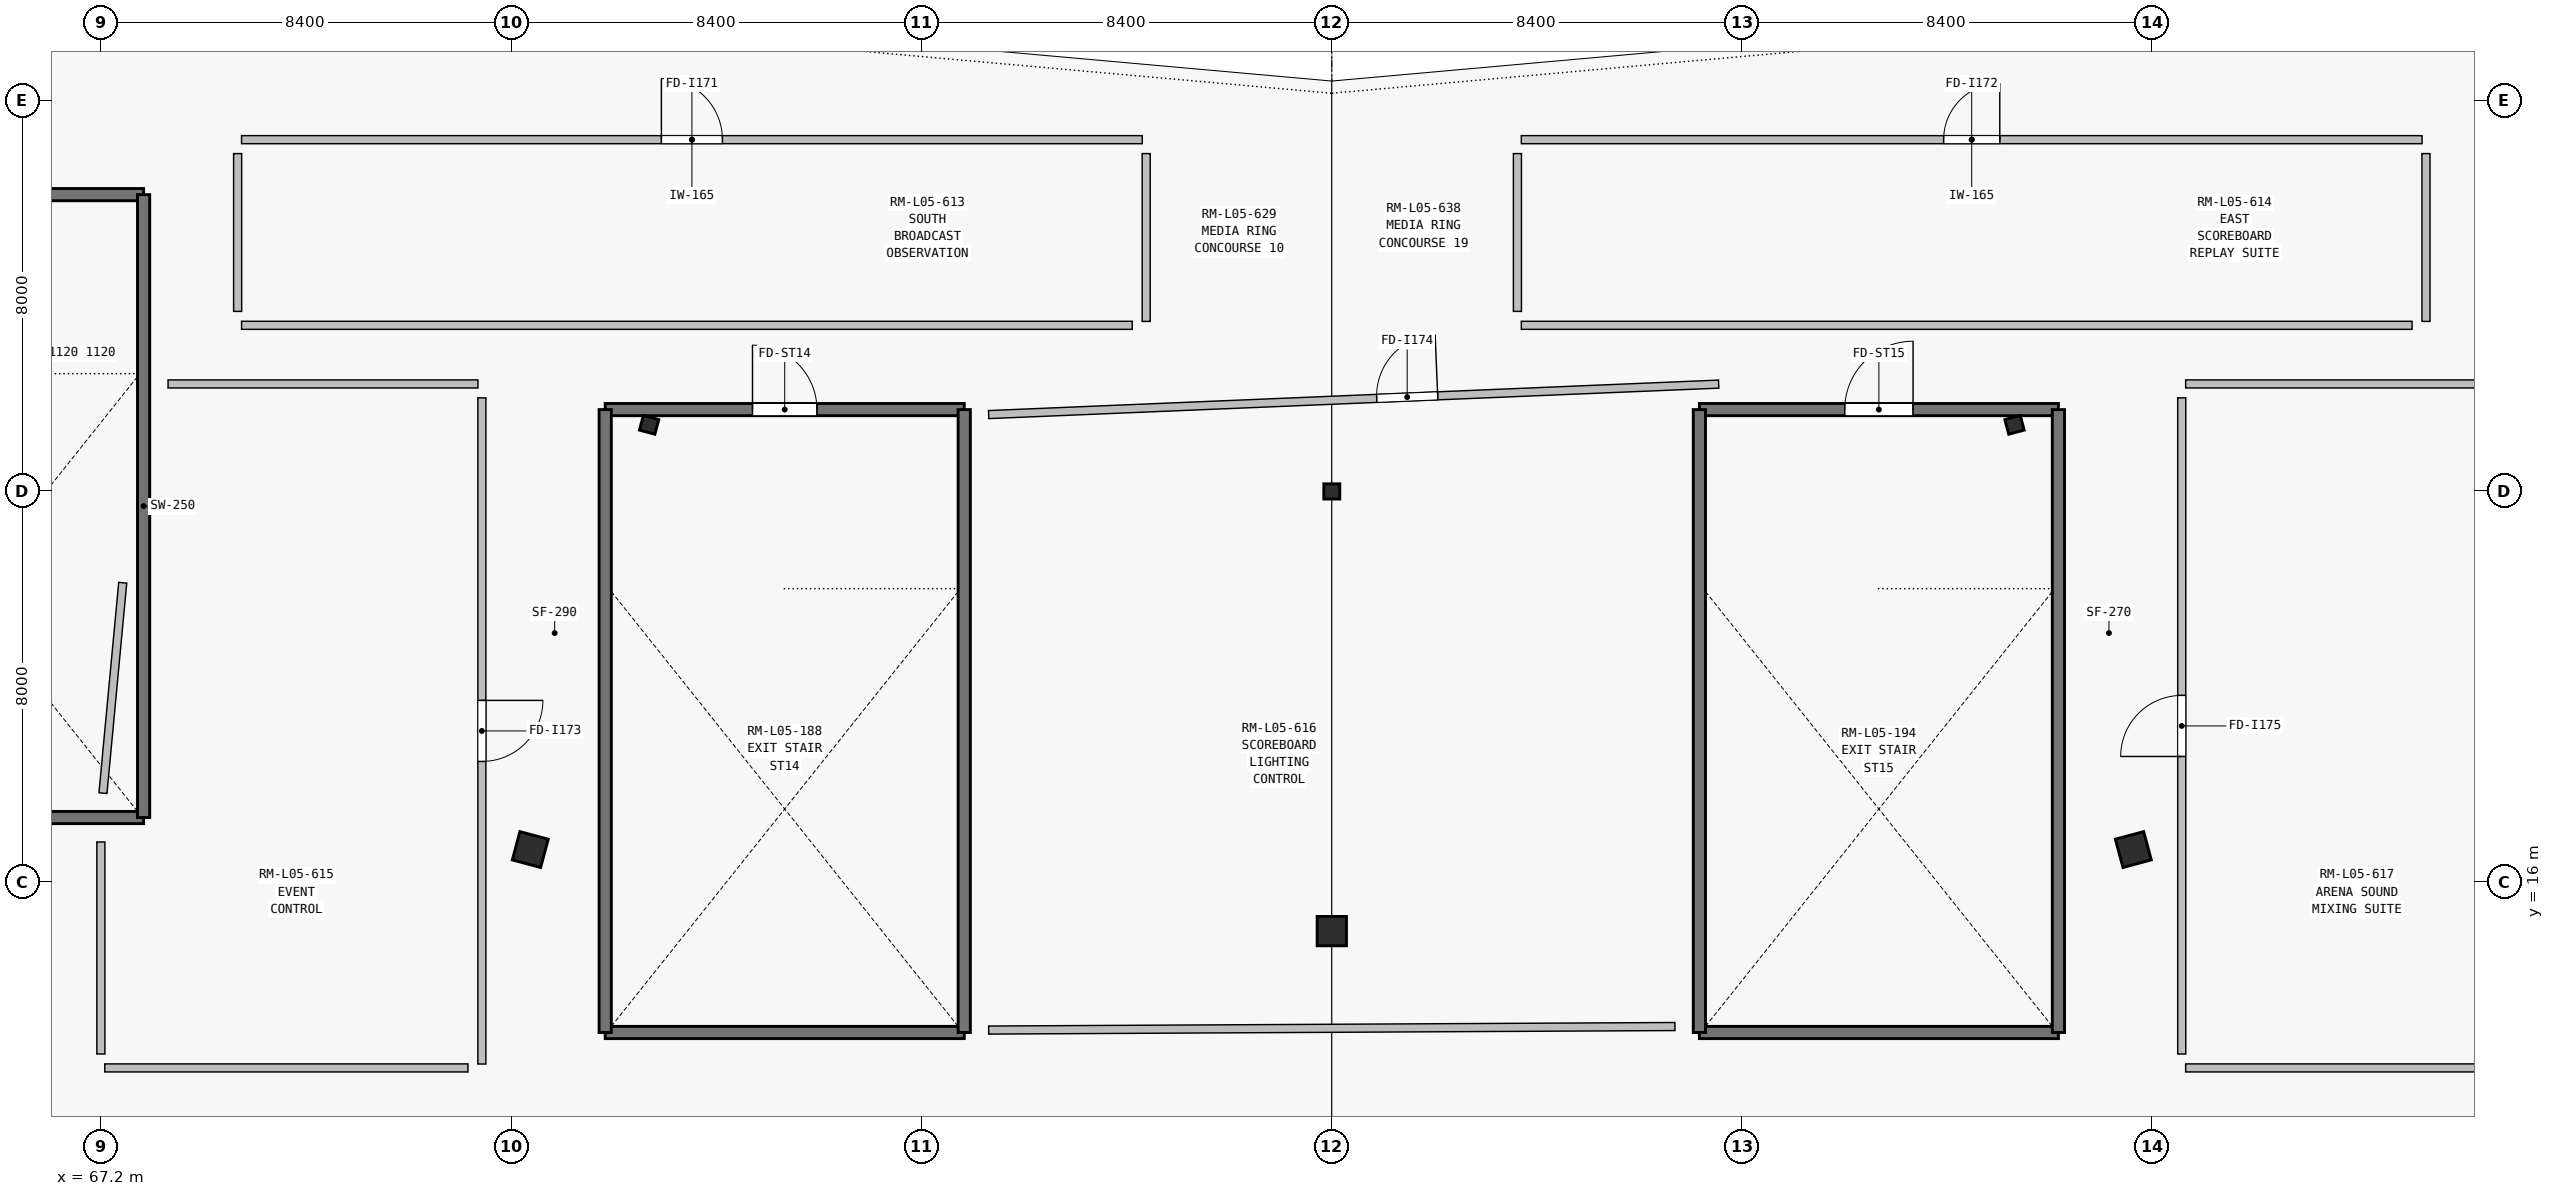
"""IFC4 building model, lengths in metres.
Left out: names, types, materials, properties, quantities, classifications, styles, units other than length and angle.
Written with IfcOpenShell. Run it as: python <this file> out.ifc"""

import sys

from ifc_helpers import new_model, si_unit, direction, frame, frame_2d, origin, origin_2d, place, context, subcontext, project, spatial, rectangle, i_section, extrude, element, fill, save


model = new_model("IFC4")
c1 = context("Model", 3, precision=1e-05, world=origin(), true_north=direction((0.0, 1.0)))
c2 = subcontext(c1, "Body", "Model", "MODEL_VIEW")
j1 = project(units=[si_unit("LENGTHUNIT", "METRE"), si_unit("PLANEANGLEUNIT", "RADIAN")], contexts=[c1])
p1 = place(None, origin())
s1 = spatial("IfcSite", under=j1, at=p1, CompositionType="ELEMENT")
p2 = place(p1, origin())
s2 = spatial("IfcBuilding", under=s1, at=p2, CompositionType="ELEMENT")
p3 = place(p2, frame((0.0, 0.0, 23.4)))
s3 = spatial("IfcBuildingStorey", under=s2, at=p3, CompositionType="ELEMENT", Elevation=23.4)
for number, where, z_axis, x_axis in (
    (1, (78.424, 25.363, 0.0), (0.0, 0.0, 1.0), (-0.259, -0.966, 0.0)),
    (2, (92.4, 24.0, 0.0), (0.0, 0.0, 1.0), (0.0, -1.0, 0.0)),
    (3, (106.376, 25.363, 0.0), (0.0, 0.0, 1.0), (0.259, -0.966, 0.0)),
):
    element("IfcColumn", number, at=place(p3, frame(where, z_axis=z_axis, x_axis=x_axis)), inside=s3, PredefinedType="COLUMN", context=c2, shape_type="SweptSolid", body=[
        extrude(i_section(OverallWidth=0.311, OverallDepth=0.327, WebThickness=0.016, FlangeThickness=0.025, at=origin_2d()), origin(), (0.0, 0.0, 1.0), 3.15),
    ])
for number, where, z_axis, x_axis in (
    (4, (75.991, 16.67, 0.0), (0.0, 0.0, 1.0), (-0.259, -0.966, 0.0)),
    (5, (92.4, 15.0, 0.0), (0.0, 0.0, 1.0), (0.0, -1.0, 0.0)),
    (6, (108.809, 16.67, 0.0), (0.0, 0.0, 1.0), (0.259, -0.966, 0.0)),
):
    element("IfcColumn", number, at=place(p3, frame(where, z_axis=z_axis, x_axis=x_axis)), inside=s3, PredefinedType="COLUMN", context=c2, shape_type="SweptSolid", body=[
        extrude(rectangle(XDim=0.6, YDim=0.6, at=origin_2d()), origin(), (0.0, 0.0, 1.0), 3.15),
    ])
p4 = place(p3, frame((73.849, 8.44, 0.0), z_axis=(0.0, 0.0, 1.0), x_axis=(-0.949760483421, 0.312977673536, 0.0)))
e7 = element("IfcWall", 7, at=p4, inside=s3, PredefinedType="SOLIDWALL", context=c2, shape_type="SweptSolid", body=[
    extrude(rectangle(XDim=18.693, YDim=0.265, at=frame_2d((9.346, 0.0))), origin(), (0.0, 0.0, 1.0), 3.18),
])
p5 = place(p4, frame((11.85, 0.0, 0.75)))
e8 = element("IfcOpeningElement", 8, at=p5, cuts=e7, PredefinedType="OPENING", context=c2, shape_type="SweptSolid", body=[
    extrude(rectangle(XDim=1.2, YDim=2.2, at=frame_2d((0.6, 1.1))), frame((0.0, 0.142, 0.0), z_axis=(0.0, -1.0, 0.0), x_axis=(1.0, 0.0, 0.0)), (0.0, 0.0, 1.0), 0.285),
])
p6 = place(p3, frame((60.725, 17.325, 0.0), z_axis=(0.0, 0.0, 1.0), x_axis=(1.0, 0.0, 0.0)))
e9 = element("IfcWall", 9, at=p6, inside=s3, PredefinedType="SHEAR", context=c2, shape_type="SweptSolid", body=[
    extrude(rectangle(XDim=7.35, YDim=0.25, at=frame_2d((3.675, 0.0))), origin(), (0.0, 0.0, 1.0), 3.08),
])
p7 = place(p3, frame((60.725, 30.075, 0.0), z_axis=(0.0, 0.0, 1.0), x_axis=(1.0, 0.0, 0.0)))
e10 = element("IfcWall", 10, at=p7, inside=s3, PredefinedType="SHEAR", context=c2, shape_type="SweptSolid", body=[
    extrude(rectangle(XDim=7.35, YDim=0.25, at=frame_2d((3.675, 0.0))), origin(), (0.0, 0.0, 1.0), 3.08),
])
p8 = place(p7, frame((2.975, 0.0, 0.0)))
e11 = element("IfcOpeningElement", 11, at=p8, cuts=e10, PredefinedType="OPENING", context=c2, shape_type="SweptSolid", body=[
    extrude(rectangle(XDim=1.4, YDim=2.2, at=frame_2d((0.7, 1.1))), frame((0.0, 0.135, 0.0), z_axis=(0.0, -1.0, 0.0), x_axis=(1.0, 0.0, 0.0)), (0.0, 0.0, 1.0), 0.27),
])
p9 = place(p3, frame((68.075, 17.325, 0.0), z_axis=(0.0, 0.0, 1.0), x_axis=(0.0, 1.0, 0.0)))
e12 = element("IfcWall", 12, at=p9, inside=s3, PredefinedType="SHEAR", context=c2, shape_type="SweptSolid", body=[
    extrude(rectangle(XDim=12.75, YDim=0.25, at=frame_2d((6.375, 0.0))), origin(), (0.0, 0.0, 1.0), 3.08),
])
p10 = place(p3, frame((77.525, 12.925, 0.0), z_axis=(0.0, 0.0, 1.0), x_axis=(1.0, 0.0, 0.0)))
e13 = element("IfcWall", 13, at=p10, inside=s3, PredefinedType="SHEAR", context=c2, shape_type="SweptSolid", body=[
    extrude(rectangle(XDim=7.35, YDim=0.25, at=frame_2d((3.675, 0.0))), origin(), (0.0, 0.0, 1.0), 3.08),
])
p11 = place(p3, frame((77.525, 25.675, 0.0), z_axis=(0.0, 0.0, 1.0), x_axis=(1.0, 0.0, 0.0)))
e14 = element("IfcWall", 14, at=p11, inside=s3, PredefinedType="SHEAR", context=c2, shape_type="SweptSolid", body=[
    extrude(rectangle(XDim=7.35, YDim=0.25, at=frame_2d((3.675, 0.0))), origin(), (0.0, 0.0, 1.0), 3.08),
])
p12 = place(p11, frame((3.015, 0.0, 0.0)))
e15 = element("IfcOpeningElement", 15, at=p12, cuts=e14, PredefinedType="OPENING", context=c2, shape_type="SweptSolid", body=[
    extrude(rectangle(XDim=1.32, YDim=2.2, at=frame_2d((0.66, 1.1))), frame((0.0, 0.135, 0.0), z_axis=(0.0, -1.0, 0.0), x_axis=(1.0, 0.0, 0.0)), (0.0, 0.0, 1.0), 0.27),
])
for number, where, z_axis, x_axis in (
    (16, (77.525, 12.925, 0.0), (0.0, 0.0, 1.0), (0.0, 1.0, 0.0)),
    (17, (84.875, 12.925, 0.0), (0.0, 0.0, 1.0), (0.0, 1.0, 0.0)),
):
    element("IfcWall", number, at=place(p3, frame(where, z_axis=z_axis, x_axis=x_axis)), inside=s3, PredefinedType="SHEAR", context=c2, shape_type="SweptSolid", body=[
        extrude(rectangle(XDim=12.75, YDim=0.25, at=frame_2d((6.375, 0.0))), origin(), (0.0, 0.0, 1.0), 3.08),
    ])
p13 = place(p3, frame((99.925, 12.925, 0.0), z_axis=(0.0, 0.0, 1.0), x_axis=(1.0, 0.0, 0.0)))
e18 = element("IfcWall", 18, at=p13, inside=s3, PredefinedType="SHEAR", context=c2, shape_type="SweptSolid", body=[
    extrude(rectangle(XDim=7.35, YDim=0.25, at=frame_2d((3.675, 0.0))), origin(), (0.0, 0.0, 1.0), 3.08),
])
p14 = place(p3, frame((99.925, 25.675, 0.0), z_axis=(0.0, 0.0, 1.0), x_axis=(1.0, 0.0, 0.0)))
e19 = element("IfcWall", 19, at=p14, inside=s3, PredefinedType="SHEAR", context=c2, shape_type="SweptSolid", body=[
    extrude(rectangle(XDim=7.35, YDim=0.25, at=frame_2d((3.675, 0.0))), origin(), (0.0, 0.0, 1.0), 3.08),
])
p15 = place(p14, frame((2.975, 0.0, 0.0)))
e20 = element("IfcOpeningElement", 20, at=p15, cuts=e19, PredefinedType="OPENING", context=c2, shape_type="SweptSolid", body=[
    extrude(rectangle(XDim=1.4, YDim=2.2, at=frame_2d((0.7, 1.1))), frame((0.0, 0.135, 0.0), z_axis=(0.0, -1.0, 0.0), x_axis=(1.0, 0.0, 0.0)), (0.0, 0.0, 1.0), 0.27),
])
for number, where, z_axis, x_axis in (
    (21, (99.925, 12.925, 0.0), (0.0, 0.0, 1.0), (0.0, 1.0, 0.0)),
    (22, (107.275, 12.925, 0.0), (0.0, 0.0, 1.0), (0.0, 1.0, 0.0)),
):
    element("IfcWall", number, at=place(p3, frame(where, z_axis=z_axis, x_axis=x_axis)), inside=s3, PredefinedType="SHEAR", context=c2, shape_type="SweptSolid", body=[
        extrude(rectangle(XDim=12.75, YDim=0.25, at=frame_2d((6.375, 0.0))), origin(), (0.0, 0.0, 1.0), 3.08),
    ])
p16 = place(p3, frame((70.08, 31.2, 0.0), z_axis=(0.0, 0.0, 1.0), x_axis=(1.0, 0.0, 0.0)))
e23 = element("IfcWall", 23, at=p16, inside=s3, PredefinedType="PARTITIONING", context=c2, shape_type="SweptSolid", body=[
    extrude(rectangle(XDim=18.44, YDim=0.165, at=frame_2d((9.22, 0.0))), origin(), (0.0, 0.0, 1.0), 3.9),
])
p17 = place(p16, frame((8.595, 0.0, 0.0)))
e24 = element("IfcOpeningElement", 24, at=p17, cuts=e23, PredefinedType="OPENING", context=c2, shape_type="SweptSolid", body=[
    extrude(rectangle(XDim=1.25, YDim=2.25, at=frame_2d((0.625, 1.125))), frame((0.0, 0.093, 0.0), z_axis=(0.0, -1.0, 0.0), x_axis=(1.0, 0.0, 0.0)), (0.0, 0.0, 1.0), 0.185),
])
p18 = place(p3, frame((88.6, 30.915, 0.0), z_axis=(0.0, 0.0, 1.0), x_axis=(0.0, -1.0, 0.0)))
e25 = element("IfcWall", 25, at=p18, inside=s3, PredefinedType="PARTITIONING", context=c2, shape_type="SweptSolid", body=[
    extrude(rectangle(XDim=3.435, YDim=0.165, at=frame_2d((1.718, 0.0))), origin(), (0.0, 0.0, 1.0), 3.9),
])
p19 = place(p3, frame((88.315, 27.4, 0.0), z_axis=(0.0, 0.0, 1.0), x_axis=(-1.0, 0.0, 0.0)))
e26 = element("IfcWall", 26, at=p19, inside=s3, PredefinedType="PARTITIONING", context=c2, shape_type="SweptSolid", body=[
    extrude(rectangle(XDim=18.235, YDim=0.165, at=frame_2d((9.118, 0.0))), origin(), (0.0, 0.0, 1.0), 2.445),
])
p20 = place(p3, frame((70.0, 27.685, 0.0), z_axis=(0.0, 0.0, 1.0), x_axis=(0.0, 1.0, 0.0)))
e27 = element("IfcWall", 27, at=p20, inside=s3, PredefinedType="PARTITIONING", context=c2, shape_type="SweptSolid", body=[
    extrude(rectangle(XDim=3.23, YDim=0.165, at=frame_2d((1.615, 0.0))), origin(), (0.0, 0.0, 1.0), 2.445),
])
p21 = place(p3, frame((96.28, 31.2, 0.0), z_axis=(0.0, 0.0, 1.0), x_axis=(1.0, 0.0, 0.0)))
e28 = element("IfcWall", 28, at=p21, inside=s3, PredefinedType="PARTITIONING", context=c2, shape_type="SweptSolid", body=[
    extrude(rectangle(XDim=18.44, YDim=0.165, at=frame_2d((9.22, 0.0))), origin(), (0.0, 0.0, 1.0), 3.9),
])
p22 = place(p21, frame((8.645, 0.0, 0.0)))
e29 = element("IfcOpeningElement", 29, at=p22, cuts=e28, PredefinedType="OPENING", context=c2, shape_type="SweptSolid", body=[
    extrude(rectangle(XDim=1.15, YDim=2.2, at=frame_2d((0.575, 1.1))), frame((0.0, 0.093, 0.0), z_axis=(0.0, -1.0, 0.0), x_axis=(1.0, 0.0, 0.0)), (0.0, 0.0, 1.0), 0.185),
])
p23 = place(p3, frame((114.8, 30.915, 0.0), z_axis=(0.0, 0.0, 1.0), x_axis=(0.0, -1.0, 0.0)))
e30 = element("IfcWall", 30, at=p23, inside=s3, PredefinedType="PARTITIONING", context=c2, shape_type="SweptSolid", body=[
    extrude(rectangle(XDim=3.435, YDim=0.165, at=frame_2d((1.718, 0.0))), origin(), (0.0, 0.0, 1.0), 2.445),
])
p24 = place(p3, frame((114.515, 27.4, 0.0), z_axis=(0.0, 0.0, 1.0), x_axis=(-1.0, 0.0, 0.0)))
e31 = element("IfcWall", 31, at=p24, inside=s3, PredefinedType="PARTITIONING", context=c2, shape_type="SweptSolid", body=[
    extrude(rectangle(XDim=18.235, YDim=0.165, at=frame_2d((9.118, 0.0))), origin(), (0.0, 0.0, 1.0), 2.445),
])
p25 = place(p3, frame((96.2, 27.685, 0.0), z_axis=(0.0, 0.0, 1.0), x_axis=(0.0, 1.0, 0.0)))
e32 = element("IfcWall", 32, at=p25, inside=s3, PredefinedType="PARTITIONING", context=c2, shape_type="SweptSolid", body=[
    extrude(rectangle(XDim=3.23, YDim=0.165, at=frame_2d((1.615, 0.0))), origin(), (0.0, 0.0, 1.0), 3.9),
])
p26 = place(p3, frame((67.243, 17.825, 0.0), z_axis=(0.0, 0.0, 1.0), x_axis=(0.093589006701, 0.995610916887, 0.0)))
e33 = element("IfcWall", 33, at=p26, inside=s3, PredefinedType="PARTITIONING", context=c2, shape_type="SweptSolid", body=[
    extrude(rectangle(XDim=4.325, YDim=0.165, at=frame_2d((2.163, 0.0))), origin(), (0.0, 0.0, 1.0), 3.18),
])
p27 = place(p3, frame((68.575, 26.2, 0.0), z_axis=(0.0, 0.0, 1.0), x_axis=(1.0, 0.0, 0.0)))
e34 = element("IfcWall", 34, at=p27, inside=s3, PredefinedType="PARTITIONING", context=c2, shape_type="SweptSolid", body=[
    extrude(rectangle(XDim=6.345, YDim=0.165, at=frame_2d((3.172, 0.0))), origin(), (0.0, 0.0, 1.0), 2.445),
])
p28 = place(p3, frame((75.0, 25.915, 0.0), z_axis=(0.0, 0.0, 1.0), x_axis=(0.0, -1.0, 0.0)))
e35 = element("IfcWall", 35, at=p28, inside=s3, PredefinedType="PARTITIONING", context=c2, shape_type="SweptSolid", body=[
    extrude(rectangle(XDim=13.635, YDim=0.165, at=frame_2d((6.818, 0.0))), origin(), (0.0, 0.0, 1.0), 2.445),
])
p29 = place(p28, frame((6.193, 0.0, 0.0)))
e36 = element("IfcOpeningElement", 36, at=p29, cuts=e35, PredefinedType="OPENING", context=c2, shape_type="SweptSolid", body=[
    extrude(rectangle(XDim=1.25, YDim=2.25, at=frame_2d((0.625, 1.125))), frame((0.0, 0.093, 0.0), z_axis=(0.0, -1.0, 0.0), x_axis=(1.0, 0.0, 0.0)), (0.0, 0.0, 1.0), 0.185),
])
p30 = place(p3, frame((74.715, 12.2, 0.0), z_axis=(0.0, 0.0, 1.0), x_axis=(-1.0, 0.0, 0.0)))
e37 = element("IfcWall", 37, at=p30, inside=s3, PredefinedType="PARTITIONING", context=c2, shape_type="SweptSolid", body=[
    extrude(rectangle(XDim=7.435, YDim=0.165, at=frame_2d((3.718, 0.0))), origin(), (0.0, 0.0, 1.0), 3.18),
])
p31 = place(p3, frame((67.2, 12.485, 0.0), z_axis=(0.0, 0.0, 1.0), x_axis=(0.0, 1.0, 0.0)))
e38 = element("IfcWall", 38, at=p31, inside=s3, PredefinedType="PARTITIONING", context=c2, shape_type="SweptSolid", body=[
    extrude(rectangle(XDim=4.34, YDim=0.165, at=frame_2d((2.17, 0.0))), origin(), (0.0, 0.0, 1.0), 3.18),
])
p32 = place(p3, frame((85.375, 25.573, 0.0), z_axis=(0.0, 0.0, 1.0), x_axis=(0.999129420221, 0.041718121344, 0.0)))
e39 = element("IfcWall", 39, at=p32, inside=s3, PredefinedType="PARTITIONING", context=c2, shape_type="SweptSolid", body=[
    extrude(rectangle(XDim=14.958, YDim=0.165, at=frame_2d((7.479, 0.0))), origin(), (0.0, 0.0, 1.0), 3.9),
])
p33 = place(p32, frame((7.951, 0.0, 0.0)))
e40 = element("IfcOpeningElement", 40, at=p33, cuts=e39, PredefinedType="OPENING", context=c2, shape_type="SweptSolid", body=[
    extrude(rectangle(XDim=1.25, YDim=2.25, at=frame_2d((0.625, 1.125))), frame((0.0, 0.093, 0.0), z_axis=(0.0, -1.0, 0.0), x_axis=(1.0, 0.0, 0.0)), (0.0, 0.0, 1.0), 0.185),
])
p34 = place(p3, frame((99.425, 13.047, 0.0), z_axis=(0.0, 0.0, 1.0), x_axis=(-0.99998686198, -0.005125999136, 0.0)))
e41 = element("IfcWall", 41, at=p34, inside=s3, PredefinedType="PARTITIONING", context=c2, shape_type="SweptSolid", body=[
    extrude(rectangle(XDim=14.05, YDim=0.165, at=frame_2d((7.025, 0.0))), origin(), (0.0, 0.0, 1.0), 3.18),
])
p35 = place(p3, frame((109.88, 26.2, 0.0), z_axis=(0.0, 0.0, 1.0), x_axis=(1.0, 0.0, 0.0)))
e42 = element("IfcWall", 42, at=p35, inside=s3, PredefinedType="PARTITIONING", context=c2, shape_type="SweptSolid", body=[
    extrude(rectangle(XDim=6.345, YDim=0.165, at=frame_2d((3.173, 0.0))), origin(), (0.0, 0.0, 1.0), 2.445),
])
p36 = place(p3, frame((117.302, 12.2, 0.0), z_axis=(0.0, 0.0, 1.0), x_axis=(-1.0, 0.0, 0.0)))
e43 = element("IfcWall", 43, at=p36, inside=s3, PredefinedType="PARTITIONING", context=c2, shape_type="SweptSolid", body=[
    extrude(rectangle(XDim=7.422, YDim=0.165, at=frame_2d((3.711, 0.0))), origin(), (0.0, 0.0, 1.0), 3.18),
])
p37 = place(p3, frame((109.8, 12.485, 0.0), z_axis=(0.0, 0.0, 1.0), x_axis=(0.0, 1.0, 0.0)))
e44 = element("IfcWall", 44, at=p37, inside=s3, PredefinedType="PARTITIONING", context=c2, shape_type="SweptSolid", body=[
    extrude(rectangle(XDim=13.43, YDim=0.165, at=frame_2d((6.715, 0.0))), origin(), (0.0, 0.0, 1.0), 2.445),
])
p38 = place(p37, frame((6.09, 0.0, 0.0)))
e45 = element("IfcOpeningElement", 45, at=p38, cuts=e44, PredefinedType="OPENING", context=c2, shape_type="SweptSolid", body=[
    extrude(rectangle(XDim=1.25, YDim=2.25, at=frame_2d((0.625, 1.125))), frame((0.0, 0.093, 0.0), z_axis=(0.0, -1.0, 0.0), x_axis=(1.0, 0.0, 0.0)), (0.0, 0.0, 1.0), 0.185),
])
p39 = place(p12, origin())
e46 = element("IfcDoor", 46, at=p39, inside=s3, OperationType="SINGLE_SWING_LEFT", PredefinedType="DOOR", context=c2, shape_type="SweptSolid", body=[
    extrude(rectangle(XDim=1.32, YDim=2.2, at=frame_2d((0.66, 1.1))), frame((0.0, 0.025, 0.0), z_axis=(0.0, -1.0, 0.0), x_axis=(1.0, 0.0, 0.0)), (0.0, 0.0, 1.0), 0.05),
])
fill(e15, e46)
p40 = place(p15, origin())
e47 = element("IfcDoor", 47, at=p40, inside=s3, OperationType="SINGLE_SWING_RIGHT", PredefinedType="DOOR", context=c2, shape_type="SweptSolid", body=[
    extrude(rectangle(XDim=1.4, YDim=2.2, at=frame_2d((0.7, 1.1))), frame((0.0, 0.025, 0.0), z_axis=(0.0, -1.0, 0.0), x_axis=(1.0, 0.0, 0.0)), (0.0, 0.0, 1.0), 0.05),
])
fill(e20, e47)
p41 = place(p17, origin())
e48 = element("IfcDoor", 48, at=p41, inside=s3, OperationType="SINGLE_SWING_LEFT", PredefinedType="DOOR", context=c2, shape_type="SweptSolid", body=[
    extrude(rectangle(XDim=1.25, YDim=2.25, at=frame_2d((0.625, 1.125))), frame((0.0, 0.025, 0.0), z_axis=(0.0, -1.0, 0.0), x_axis=(1.0, 0.0, 0.0)), (0.0, 0.0, 1.0), 0.05),
])
fill(e24, e48)
p42 = place(p22, origin())
e49 = element("IfcDoor", 49, at=p42, inside=s3, OperationType="SINGLE_SWING_RIGHT", PredefinedType="DOOR", context=c2, shape_type="SweptSolid", body=[
    extrude(rectangle(XDim=1.15, YDim=2.2, at=frame_2d((0.575, 1.1))), frame((0.0, 0.025, 0.0), z_axis=(0.0, -1.0, 0.0), x_axis=(1.0, 0.0, 0.0)), (0.0, 0.0, 1.0), 0.05),
])
fill(e29, e49)
p43 = place(p29, origin())
e50 = element("IfcDoor", 50, at=p43, inside=s3, OperationType="SINGLE_SWING_LEFT", PredefinedType="DOOR", context=c2, shape_type="SweptSolid", body=[
    extrude(rectangle(XDim=1.25, YDim=2.25, at=frame_2d((0.625, 1.125))), frame((0.0, 0.025, 0.0), z_axis=(0.0, -1.0, 0.0), x_axis=(1.0, 0.0, 0.0)), (0.0, 0.0, 1.0), 0.05),
])
fill(e36, e50)
p44 = place(p33, origin())
e51 = element("IfcDoor", 51, at=p44, inside=s3, OperationType="SINGLE_SWING_RIGHT", PredefinedType="DOOR", context=c2, shape_type="SweptSolid", body=[
    extrude(rectangle(XDim=1.25, YDim=2.25, at=frame_2d((0.625, 1.125))), frame((0.0, 0.025, 0.0), z_axis=(0.0, -1.0, 0.0), x_axis=(1.0, 0.0, 0.0)), (0.0, 0.0, 1.0), 0.05),
])
fill(e40, e51)
p45 = place(p38, origin())
e52 = element("IfcDoor", 52, at=p45, inside=s3, OperationType="SINGLE_SWING_LEFT", PredefinedType="DOOR", context=c2, shape_type="SweptSolid", body=[
    extrude(rectangle(XDim=1.25, YDim=2.25, at=frame_2d((0.625, 1.125))), frame((0.0, 0.025, 0.0), z_axis=(0.0, -1.0, 0.0), x_axis=(1.0, 0.0, 0.0)), (0.0, 0.0, 1.0), 0.05),
])
fill(e45, e52)
save(model, sys.argv[1])
